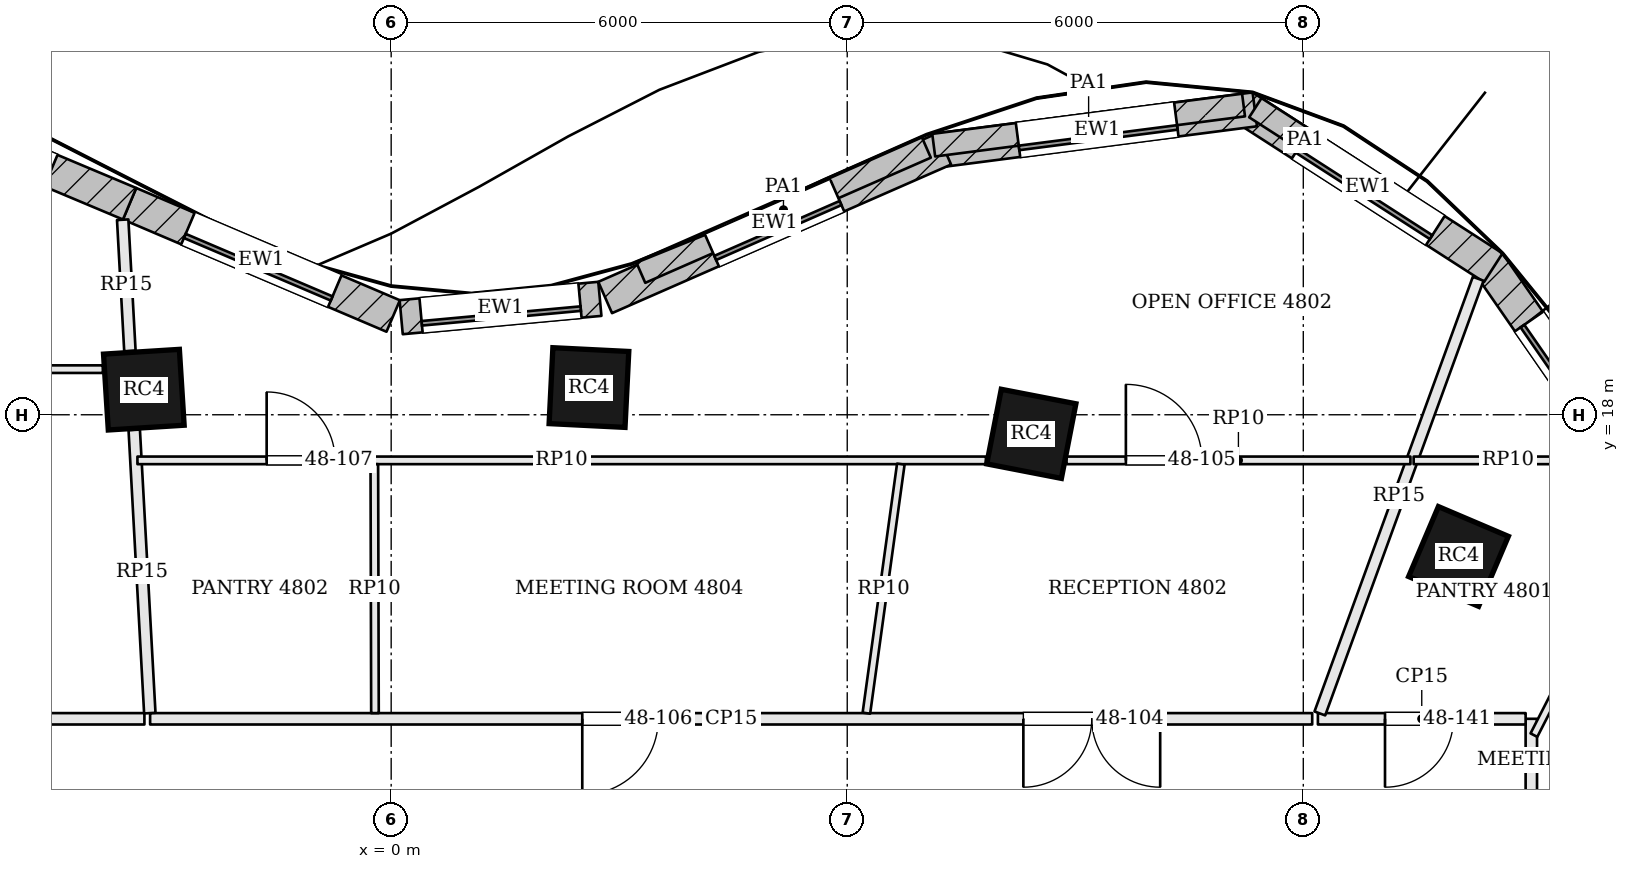
"""IFC4 building model, lengths in metres.
Left out: names, types, materials, properties, quantities, classifications, styles, units other than length and angle.
Written with IfcOpenShell. Run it as: python <this file> out.ifc"""

import sys

from ifc_helpers import new_model, si_unit, direction, frame, frame_2d, origin, origin_2d, place, context, subcontext, project, spatial, rectangle, extrude, element, fill, save


model = new_model("IFC4")
c1 = context("Model", 3, precision=1e-05, world=origin(), true_north=direction((0.0, 1.0)))
c2 = subcontext(c1, "Body", "Model", "MODEL_VIEW")
j1 = project(units=[si_unit("LENGTHUNIT", "METRE"), si_unit("PLANEANGLEUNIT", "RADIAN")], contexts=[c1])
p1 = place(None, origin())
s1 = spatial("IfcSite", under=j1, at=p1, CompositionType="ELEMENT")
p2 = place(p1, origin())
s2 = spatial("IfcBuilding", under=s1, at=p2, CompositionType="ELEMENT")
p3 = place(p2, frame((0.0, 0.0, 197.4)))
s3 = spatial("IfcBuildingStorey", under=s2, at=p3, CompositionType="ELEMENT", Elevation=197.4)
for number, where, z_axis, x_axis in (
    (1, (14.042, 16.136, 0.0), (0.0, 0.0, 1.0), (-0.92, 0.392, 0.0)),
    (2, (8.422, 17.749, 0.0), (0.0, 0.0, 1.0), (-0.982, 0.191, 0.0)),
    (3, (2.602, 18.358, 0.0), (0.0, 0.0, 1.0), (-0.999, 0.05, 0.0)),
    (4, (-3.254, 18.33, 0.0), (0.0, 0.0, 1.0), (-0.998, -0.063, 0.0)),
):
    element("IfcColumn", number, at=place(p3, frame(where, z_axis=z_axis, x_axis=x_axis)), inside=s3, PredefinedType="COLUMN", context=c2, shape_type="SweptSolid", body=[
        extrude(rectangle(XDim=1.0, YDim=1.0, at=origin_2d()), origin(), (0.0, 0.0, 1.0), 3.9),
    ])
p4 = place(p3, frame((16.695, 16.737, 0.0), z_axis=(0.0, 0.0, 1.0), x_axis=(-0.569652445465, 0.821885692402, 0.0)))
e5 = element("IfcWall", 5, at=p4, inside=s3, PredefinedType="SOLIDWALL", context=c2, shape_type="SweptSolid", body=[
    extrude(rectangle(XDim=3.959, YDim=0.45, at=frame_2d((1.979, 0.0))), origin(), (0.0, 0.0, 1.0), 3.7),
])
p5 = place(p4, frame((0.929, 0.0, 0.9)))
e6 = element("IfcOpeningElement", 6, at=p5, cuts=e5, PredefinedType="OPENING", context=c2, shape_type="SweptSolid", body=[
    extrude(rectangle(XDim=2.1, YDim=2.3, at=frame_2d((1.05, 1.15))), frame((0.0, 0.235, 0.0), z_axis=(0.0, -1.0, 0.0), x_axis=(1.0, 0.0, 0.0)), (0.0, 0.0, 1.0), 0.47),
])
p6 = place(p3, frame((14.499, 19.935, 0.0), z_axis=(0.0, 0.0, 1.0), x_axis=(-0.84080910763, 0.541331732422, 0.0)))
e7 = element("IfcWall", 7, at=p6, inside=s3, PredefinedType="SOLIDWALL", context=c2, shape_type="SweptSolid", body=[
    extrude(rectangle(XDim=3.911, YDim=0.45, at=frame_2d((1.955, 0.0))), origin(), (0.0, 0.0, 1.0), 3.7),
])
p7 = place(p6, frame((0.905, 0.0, 0.9)))
e8 = element("IfcOpeningElement", 8, at=p7, cuts=e7, PredefinedType="OPENING", context=c2, shape_type="SweptSolid", body=[
    extrude(rectangle(XDim=2.1, YDim=2.3, at=frame_2d((1.05, 1.15))), frame((0.0, 0.235, 0.0), z_axis=(0.0, -1.0, 0.0), x_axis=(1.0, 0.0, 0.0)), (0.0, 0.0, 1.0), 0.47),
])
p8 = place(p3, frame((11.362, 22.018, 0.0), z_axis=(0.0, 0.0, 1.0), x_axis=(-0.991724958022, -0.128380713645, 0.0)))
e9 = element("IfcWall", 9, at=p8, inside=s3, PredefinedType="SOLIDWALL", context=c2, shape_type="SweptSolid", body=[
    extrude(rectangle(XDim=4.182, YDim=0.45, at=frame_2d((2.091, 0.0))), origin(), (0.0, 0.0, 1.0), 3.7),
])
p9 = place(p8, frame((1.041, 0.0, 0.9)))
e10 = element("IfcOpeningElement", 10, at=p9, cuts=e9, PredefinedType="OPENING", context=c2, shape_type="SweptSolid", body=[
    extrude(rectangle(XDim=2.1, YDim=2.3, at=frame_2d((1.05, 1.15))), frame((0.0, 0.235, 0.0), z_axis=(0.0, -1.0, 0.0), x_axis=(1.0, 0.0, 0.0)), (0.0, 0.0, 1.0), 0.47),
])
p10 = place(p3, frame((7.276, 21.498, 0.0), z_axis=(0.0, 0.0, 1.0), x_axis=(-0.915872941312, -0.401468249519, 0.0)))
e11 = element("IfcWall", 11, at=p10, inside=s3, PredefinedType="SOLIDWALL", context=c2, shape_type="SweptSolid", body=[
    extrude(rectangle(XDim=4.87, YDim=0.45, at=frame_2d((2.435, 0.0))), origin(), (0.0, 0.0, 1.0), 3.7),
])
p11 = place(p10, frame((1.535, 0.0, 0.9)))
e12 = element("IfcOpeningElement", 12, at=p11, cuts=e11, PredefinedType="OPENING", context=c2, shape_type="SweptSolid", body=[
    extrude(rectangle(XDim=1.8, YDim=2.3, at=frame_2d((0.9, 1.15))), frame((0.0, 0.235, 0.0), z_axis=(0.0, -1.0, 0.0), x_axis=(1.0, 0.0, 0.0)), (0.0, 0.0, 1.0), 0.47),
])
p12 = place(p3, frame((2.745, 19.525, 0.0), z_axis=(0.0, 0.0, 1.0), x_axis=(-0.995768774275, -0.091894222771, 0.0)))
e13 = element("IfcWall", 13, at=p12, inside=s3, PredefinedType="SOLIDWALL", context=c2, shape_type="SweptSolid", body=[
    extrude(rectangle(XDim=2.625, YDim=0.45, at=frame_2d((1.312, 0.0))), origin(), (0.0, 0.0, 1.0), 3.7),
])
p13 = place(p12, frame((0.262, 0.0, 0.9)))
e14 = element("IfcOpeningElement", 14, at=p13, cuts=e13, PredefinedType="OPENING", context=c2, shape_type="SweptSolid", body=[
    extrude(rectangle(XDim=2.1, YDim=2.3, at=frame_2d((1.05, 1.15))), frame((0.0, 0.235, 0.0), z_axis=(0.0, -1.0, 0.0), x_axis=(1.0, 0.0, 0.0)), (0.0, 0.0, 1.0), 0.47),
])
p14 = place(p3, frame((0.026, 19.299, 0.0), z_axis=(0.0, 0.0, 1.0), x_axis=(-0.920040408927, 0.391823488245, 0.0)))
e15 = element("IfcWall", 15, at=p14, inside=s3, PredefinedType="SOLIDWALL", context=c2, shape_type="SweptSolid", body=[
    extrude(rectangle(XDim=3.77, YDim=0.45, at=frame_2d((1.885, 0.0))), origin(), (0.0, 0.0, 1.0), 3.7),
])
p15 = place(p14, frame((0.835, 0.0, 0.9)))
e16 = element("IfcOpeningElement", 16, at=p15, cuts=e15, PredefinedType="OPENING", context=c2, shape_type="SweptSolid", body=[
    extrude(rectangle(XDim=2.1, YDim=2.3, at=frame_2d((1.05, 1.15))), frame((0.0, 0.235, 0.0), z_axis=(0.0, -1.0, 0.0), x_axis=(1.0, 0.0, 0.0)), (0.0, 0.0, 1.0), 0.47),
])
p16 = place(p3, frame((-3.441, 20.776, 0.0), z_axis=(0.0, 0.0, 1.0), x_axis=(-0.921988121387, 0.387218160758, 0.0)))
e17 = element("IfcWall", 17, at=p16, inside=s3, PredefinedType="SOLIDWALL", context=c2, shape_type="SweptSolid", body=[
    extrude(rectangle(XDim=4.347, YDim=0.45, at=frame_2d((2.173, 0.0))), origin(), (0.0, 0.0, 1.0), 3.7),
])
p17 = place(p16, frame((1.123, 0.0, 0.9)))
e18 = element("IfcOpeningElement", 18, at=p17, cuts=e17, PredefinedType="OPENING", context=c2, shape_type="SweptSolid", body=[
    extrude(rectangle(XDim=2.1, YDim=2.3, at=frame_2d((1.05, 1.15))), frame((0.0, 0.235, 0.0), z_axis=(0.0, -1.0, 0.0), x_axis=(1.0, 0.0, 0.0)), (0.0, 0.0, 1.0), 0.47),
])
p18 = place(p3, frame((12.68, 21.195, 3.9), z_axis=(0.0, 0.0, 1.0), x_axis=(-0.840806975541, 0.541335044018, 0.0)))
e19 = element("IfcWall", 19, at=p18, inside=s3, PredefinedType="PARAPET", context=c2, shape_type="SweptSolid", body=[
    extrude(rectangle(XDim=1.56, YDim=0.3, at=frame_2d((0.78, 0.0))), origin(), (0.0, 0.0, 1.0), 1.1),
])
p19 = place(p3, frame((11.214, 22.074, 3.9), z_axis=(0.0, 0.0, 1.0), x_axis=(-0.991727449614, -0.128361464939, 0.0)))
e20 = element("IfcWall", 20, at=p19, inside=s3, PredefinedType="PARAPET", context=c2, shape_type="SweptSolid", body=[
    extrude(rectangle(XDim=4.11, YDim=0.3, at=frame_2d((2.055, 0.0))), origin(), (0.0, 0.0, 1.0), 1.1),
])
p20 = place(p3, frame((7.039, 21.519, 3.9), z_axis=(0.0, 0.0, 1.0), x_axis=(-0.915890739732, -0.401427643384, 0.0)))
e21 = element("IfcWall", 21, at=p20, inside=s3, PredefinedType="PARAPET", context=c2, shape_type="SweptSolid", body=[
    extrude(rectangle(XDim=4.102, YDim=0.3, at=frame_2d((2.051, 0.0))), origin(), (0.0, 0.0, 1.0), 1.1),
])
p21 = place(p3, frame((15.0, 10.196, 0.0), z_axis=(0.0, 0.0, 1.0), x_axis=(0.0, 1.0, 0.0)))
e22 = element("IfcWall", 22, at=p21, inside=s3, PredefinedType="PARTITIONING", context=c2, shape_type="SweptSolid", body=[
    extrude(rectangle(XDim=3.804, YDim=0.15, at=frame_2d((1.902, 0.0))), origin(), (0.0, 0.0, 1.0), 3.084),
])
p22 = place(p21, frame((1.781, 0.0, 0.0)))
e23 = element("IfcOpeningElement", 23, at=p22, cuts=e22, PredefinedType="OPENING", context=c2, shape_type="SweptSolid", body=[
    extrude(rectangle(XDim=1.0, YDim=2.4, at=frame_2d((0.5, 1.2))), frame((0.0, 0.085, 0.0), z_axis=(0.0, -1.0, 0.0), x_axis=(1.0, 0.0, 0.0)), (0.0, 0.0, 1.0), 0.17),
])
p23 = place(p3, frame((14.925, 14.0, 0.0), z_axis=(0.0, 0.0, 1.0), x_axis=(-1.0, 0.0, 0.0)))
e24 = element("IfcWall", 24, at=p23, inside=s3, PredefinedType="PARTITIONING", context=c2, shape_type="SweptSolid", body=[
    extrude(rectangle(XDim=2.733, YDim=0.15, at=frame_2d((1.366, 0.0))), origin(), (0.0, 0.0, 1.0), 3.084),
])
p24 = place(p23, frame((0.95, 0.0, 0.0)))
e25 = element("IfcOpeningElement", 25, at=p24, cuts=e24, PredefinedType="OPENING", context=c2, shape_type="SweptSolid", body=[
    extrude(rectangle(XDim=0.9, YDim=2.1, at=frame_2d((0.45, 1.05))), frame((0.0, 0.085, 0.0), z_axis=(0.0, -1.0, 0.0), x_axis=(1.0, 0.0, 0.0)), (0.0, 0.0, 1.0), 0.17),
])
p25 = place(p3, frame((14.301, 19.789, 0.0), z_axis=(0.0, 0.0, 1.0), x_axis=(-0.342258353436, -0.9396058852, 0.0)))
e26 = element("IfcWall", 26, at=p25, inside=s3, PredefinedType="PARTITIONING", context=c2, shape_type="SweptSolid", body=[
    extrude(rectangle(XDim=6.086, YDim=0.15, at=frame_2d((3.043, 0.0))), origin(), (0.0, 0.0, 1.0), 3.084),
])
p26 = place(p3, frame((12.117, 14.0, 0.0), z_axis=(0.0, 0.0, 1.0), x_axis=(-1.0, 0.0, 0.0)))
e27 = element("IfcWall", 27, at=p26, inside=s3, PredefinedType="PARTITIONING", context=c2, shape_type="SweptSolid", body=[
    extrude(rectangle(XDim=15.289, YDim=0.15, at=frame_2d((7.644, 0.0))), origin(), (0.0, 0.0, 1.0), 3.084),
])
p27 = place(p26, frame((2.0, 0.0, 0.0)))
e28 = element("IfcOpeningElement", 28, at=p27, cuts=e27, PredefinedType="OPENING", context=c2, shape_type="SweptSolid", body=[
    extrude(rectangle(XDim=1.8, YDim=2.1, at=frame_2d((0.9, 1.05))), frame((0.0, 0.085, 0.0), z_axis=(0.0, -1.0, 0.0), x_axis=(1.0, 0.0, 0.0)), (0.0, 0.0, 1.0), 0.17),
])
p28 = place(p26, frame((8.603, 0.0, 0.0)))
e29 = element("IfcOpeningElement", 29, at=p28, cuts=e27, PredefinedType="OPENING", context=c2, shape_type="SweptSolid", body=[
    extrude(rectangle(XDim=1.0, YDim=2.4, at=frame_2d((0.5, 1.2))), frame((0.0, 0.085, 0.0), z_axis=(0.0, -1.0, 0.0), x_axis=(1.0, 0.0, 0.0)), (0.0, 0.0, 1.0), 0.17),
])
p29 = place(p3, frame((-3.532, 20.566, 0.0), z_axis=(0.0, 0.0, 1.0), x_axis=(0.054930375168, -0.998490187175, 0.0)))
e30 = element("IfcWall", 30, at=p29, inside=s3, PredefinedType="PARTITIONING", context=c2, shape_type="SweptSolid", body=[
    extrude(rectangle(XDim=1.729, YDim=0.15, at=frame_2d((0.865, 0.0))), origin(), (0.0, 0.0, 1.0), 3.084),
])
p30 = place(p3, frame((-3.38, 17.801, 0.0), z_axis=(0.0, 0.0, 1.0), x_axis=(0.054890258028, -0.998492393348, 0.0)))
e31 = element("IfcWall", 31, at=p30, inside=s3, PredefinedType="PARTITIONING", context=c2, shape_type="SweptSolid", body=[
    extrude(rectangle(XDim=3.732, YDim=0.15, at=frame_2d((1.866, 0.0))), origin(), (0.0, 0.0, 1.0), 3.084),
])
p31 = place(p3, frame((-3.246, 14.0, 0.0), z_axis=(0.0, 0.0, 1.0), x_axis=(-1.0, 0.0, 0.0)))
e32 = element("IfcWall", 32, at=p31, inside=s3, PredefinedType="PARTITIONING", context=c2, shape_type="SweptSolid", body=[
    extrude(rectangle(XDim=11.754, YDim=0.15, at=frame_2d((5.877, 0.0))), origin(), (0.0, 0.0, 1.0), 3.084),
])
p32 = place(p31, frame((2.025, 0.0, 0.0)))
e33 = element("IfcOpeningElement", 33, at=p32, cuts=e32, PredefinedType="OPENING", context=c2, shape_type="SweptSolid", body=[
    extrude(rectangle(XDim=1.8, YDim=2.1, at=frame_2d((0.9, 1.05))), frame((0.0, 0.085, 0.0), z_axis=(0.0, -1.0, 0.0), x_axis=(1.0, 0.0, 0.0)), (0.0, 0.0, 1.0), 0.17),
])
p33 = place(p31, frame((6.792, 0.0, 0.0)))
e34 = element("IfcOpeningElement", 34, at=p33, cuts=e32, PredefinedType="OPENING", context=c2, shape_type="SweptSolid", body=[
    extrude(rectangle(XDim=1.0, YDim=2.4, at=frame_2d((0.5, 1.2))), frame((0.0, 0.085, 0.0), z_axis=(0.0, -1.0, 0.0), x_axis=(1.0, 0.0, 0.0)), (0.0, 0.0, 1.0), 0.17),
])
p34 = place(p31, frame((9.702, 0.0, 0.0)))
e35 = element("IfcOpeningElement", 35, at=p34, cuts=e32, PredefinedType="OPENING", context=c2, shape_type="SweptSolid", body=[
    extrude(rectangle(XDim=1.0, YDim=2.4, at=frame_2d((0.5, 1.2))), frame((0.0, 0.085, 0.0), z_axis=(0.0, -1.0, 0.0), x_axis=(1.0, 0.0, 0.0)), (0.0, 0.0, 1.0), 0.17),
])
p35 = place(p3, frame((13.452, 17.4, 0.0), z_axis=(0.0, 0.0, 1.0), x_axis=(1.0, 0.0, 0.0)))
e36 = element("IfcWall", 36, at=p35, inside=s3, PredefinedType="PARTITIONING", context=c2, shape_type="SweptSolid", body=[
    extrude(rectangle(XDim=2.486, YDim=0.1, at=frame_2d((1.243, 0.0))), origin(), (0.0, 0.0, 1.0), 3.084),
])
p36 = place(p3, frame((15.049, 11.292, 0.0), z_axis=(0.0, 0.0, 1.0), x_axis=(0.759202764933, 0.650854178536, 0.0)))
e37 = element("IfcWall", 37, at=p36, inside=s3, PredefinedType="PARTITIONING", context=c2, shape_type="SweptSolid", body=[
    extrude(rectangle(XDim=4.802, YDim=0.1, at=frame_2d((2.401, 0.0))), origin(), (0.0, 0.0, 1.0), 3.084),
])
p37 = place(p3, frame((15.034, 13.785, 0.0), z_axis=(0.0, 0.0, 1.0), x_axis=(0.455523603198, 0.890223706115, 0.0)))
e38 = element("IfcWall", 38, at=p37, inside=s3, PredefinedType="PARTITIONING", context=c2, shape_type="SweptSolid", body=[
    extrude(rectangle(XDim=3.201, YDim=0.1, at=frame_2d((1.6, 0.0))), origin(), (0.0, 0.0, 1.0), 3.084),
])
p38 = place(p3, frame((-3.338, 17.4, 0.0), z_axis=(0.0, 0.0, 1.0), x_axis=(1.0, 0.0, 0.0)))
e39 = element("IfcWall", 39, at=p38, inside=s3, PredefinedType="PARTITIONING", context=c2, shape_type="SweptSolid", body=[
    extrude(rectangle(XDim=11.163, YDim=0.1, at=frame_2d((5.581, 0.0))), origin(), (0.0, 0.0, 1.0), 3.084),
])
p39 = place(p38, frame((1.7, 0.0, 0.0)))
e40 = element("IfcOpeningElement", 40, at=p39, cuts=e39, PredefinedType="OPENING", context=c2, shape_type="SweptSolid", body=[
    extrude(rectangle(XDim=0.9, YDim=2.1, at=frame_2d((0.45, 1.05))), frame((0.0, 0.06, 0.0), z_axis=(0.0, -1.0, 0.0), x_axis=(1.0, 0.0, 0.0)), (0.0, 0.0, 1.0), 0.12),
])
p40 = place(p3, frame((8.884, 17.4, 0.0), z_axis=(0.0, 0.0, 1.0), x_axis=(1.0, 0.0, 0.0)))
e41 = element("IfcWall", 41, at=p40, inside=s3, PredefinedType="PARTITIONING", context=c2, shape_type="SweptSolid", body=[
    extrude(rectangle(XDim=4.525, YDim=0.1, at=frame_2d((2.263, 0.0))), origin(), (0.0, 0.0, 1.0), 3.084),
])
p41 = place(p40, frame((0.782, 0.0, 0.0)))
e42 = element("IfcOpeningElement", 42, at=p41, cuts=e41, PredefinedType="OPENING", context=c2, shape_type="SweptSolid", body=[
    extrude(rectangle(XDim=1.0, YDim=2.1, at=frame_2d((0.5, 1.05))), frame((0.0, 0.06, 0.0), z_axis=(0.0, -1.0, 0.0), x_axis=(1.0, 0.0, 0.0)), (0.0, 0.0, 1.0), 0.12),
])
p42 = place(p3, frame((6.252, 14.074, 0.0), z_axis=(0.0, 0.0, 1.0), x_axis=(0.136997065373, 0.990571453293, 0.0)))
e43 = element("IfcWall", 43, at=p42, inside=s3, PredefinedType="PARTITIONING", context=c2, shape_type="SweptSolid", body=[
    extrude(rectangle(XDim=3.308, YDim=0.1, at=frame_2d((1.654, 0.0))), origin(), (0.0, 0.0, 1.0), 3.084),
])
p43 = place(p3, frame((-0.213, 14.075, 0.0), z_axis=(0.0, 0.0, 1.0), x_axis=(-0.002534468192, 0.99999678823, 0.0)))
e44 = element("IfcWall", 44, at=p43, inside=s3, PredefinedType="PARTITIONING", context=c2, shape_type="SweptSolid", body=[
    extrude(rectangle(XDim=3.275, YDim=0.1, at=frame_2d((1.638, 0.0))), origin(), (0.0, 0.0, 1.0), 3.084),
])
p44 = place(p3, frame((-13.88, 18.6, 0.0), z_axis=(0.0, 0.0, 1.0), x_axis=(1.0, 0.0, 0.0)))
e45 = element("IfcWall", 45, at=p44, inside=s3, PredefinedType="PARTITIONING", context=c2, shape_type="SweptSolid", body=[
    extrude(rectangle(XDim=10.088, YDim=0.1, at=frame_2d((5.044, 0.0))), origin(), (0.0, 0.0, 1.0), 3.084),
])
p45 = place(p44, frame((6.458, 0.0, 0.0)))
e46 = element("IfcOpeningElement", 46, at=p45, cuts=e45, PredefinedType="OPENING", context=c2, shape_type="SweptSolid", body=[
    extrude(rectangle(XDim=1.0, YDim=2.1, at=frame_2d((0.5, 1.05))), frame((0.0, 0.06, 0.0), z_axis=(0.0, -1.0, 0.0), x_axis=(1.0, 0.0, 0.0)), (0.0, 0.0, 1.0), 0.12),
])
p46 = place(p5, origin())
e47 = element("IfcWindow", 47, at=p46, inside=s3, PartitioningType="SINGLE_PANEL", PredefinedType="WINDOW", context=c2, shape_type="SweptSolid", body=[
    extrude(rectangle(XDim=2.1, YDim=2.3, at=frame_2d((1.05, 1.15))), frame((0.0, 0.135, 0.0), z_axis=(0.0, -1.0, 0.0), x_axis=(1.0, 0.0, 0.0)), (0.0, 0.0, 1.0), 0.06),
])
fill(e6, e47)
p47 = place(p7, origin())
e48 = element("IfcWindow", 48, at=p47, inside=s3, PartitioningType="SINGLE_PANEL", PredefinedType="WINDOW", context=c2, shape_type="SweptSolid", body=[
    extrude(rectangle(XDim=2.1, YDim=2.3, at=frame_2d((1.05, 1.15))), frame((0.0, 0.135, 0.0), z_axis=(0.0, -1.0, 0.0), x_axis=(1.0, 0.0, 0.0)), (0.0, 0.0, 1.0), 0.06),
])
fill(e8, e48)
p48 = place(p9, origin())
e49 = element("IfcWindow", 49, at=p48, inside=s3, PartitioningType="SINGLE_PANEL", PredefinedType="WINDOW", context=c2, shape_type="SweptSolid", body=[
    extrude(rectangle(XDim=2.1, YDim=2.3, at=frame_2d((1.05, 1.15))), frame((0.0, 0.135, 0.0), z_axis=(0.0, -1.0, 0.0), x_axis=(1.0, 0.0, 0.0)), (0.0, 0.0, 1.0), 0.06),
])
fill(e10, e49)
p49 = place(p11, origin())
e50 = element("IfcWindow", 50, at=p49, inside=s3, PartitioningType="SINGLE_PANEL", PredefinedType="WINDOW", context=c2, shape_type="SweptSolid", body=[
    extrude(rectangle(XDim=1.8, YDim=2.3, at=frame_2d((0.9, 1.15))), frame((0.0, 0.135, 0.0), z_axis=(0.0, -1.0, 0.0), x_axis=(1.0, 0.0, 0.0)), (0.0, 0.0, 1.0), 0.06),
])
fill(e12, e50)
p50 = place(p13, origin())
e51 = element("IfcWindow", 51, at=p50, inside=s3, PartitioningType="SINGLE_PANEL", PredefinedType="WINDOW", context=c2, shape_type="SweptSolid", body=[
    extrude(rectangle(XDim=2.1, YDim=2.3, at=frame_2d((1.05, 1.15))), frame((0.0, 0.135, 0.0), z_axis=(0.0, -1.0, 0.0), x_axis=(1.0, 0.0, 0.0)), (0.0, 0.0, 1.0), 0.06),
])
fill(e14, e51)
p51 = place(p15, origin())
e52 = element("IfcWindow", 52, at=p51, inside=s3, PartitioningType="SINGLE_PANEL", PredefinedType="WINDOW", context=c2, shape_type="SweptSolid", body=[
    extrude(rectangle(XDim=2.1, YDim=2.3, at=frame_2d((1.05, 1.15))), frame((0.0, 0.135, 0.0), z_axis=(0.0, -1.0, 0.0), x_axis=(1.0, 0.0, 0.0)), (0.0, 0.0, 1.0), 0.06),
])
fill(e16, e52)
p52 = place(p27, origin())
e53 = element("IfcDoor", 53, at=p52, inside=s3, OperationType="DOUBLE_DOOR_SINGLE_SWING", PredefinedType="DOOR", context=c2, shape_type="SweptSolid", body=[
    extrude(rectangle(XDim=1.8, YDim=2.1, at=frame_2d((0.9, 1.05))), frame((0.0, 0.025, 0.0), z_axis=(0.0, -1.0, 0.0), x_axis=(1.0, 0.0, 0.0)), (0.0, 0.0, 1.0), 0.05),
])
fill(e28, e53)
p53 = place(p41, origin())
e54 = element("IfcDoor", 54, at=p53, inside=s3, OperationType="SINGLE_SWING_LEFT", PredefinedType="DOOR", context=c2, shape_type="SweptSolid", body=[
    extrude(rectangle(XDim=1.0, YDim=2.1, at=frame_2d((0.5, 1.05))), frame((0.0, 0.025, 0.0), z_axis=(0.0, -1.0, 0.0), x_axis=(1.0, 0.0, 0.0)), (0.0, 0.0, 1.0), 0.05),
])
fill(e42, e54)
p54 = place(p28, origin())
e55 = element("IfcDoor", 55, at=p54, inside=s3, OperationType="SINGLE_SWING_RIGHT", PredefinedType="DOOR", context=c2, shape_type="SweptSolid", body=[
    extrude(rectangle(XDim=1.0, YDim=2.4, at=frame_2d((0.5, 1.2))), frame((0.0, 0.025, 0.0), z_axis=(0.0, -1.0, 0.0), x_axis=(1.0, 0.0, 0.0)), (0.0, 0.0, 1.0), 0.05),
])
fill(e29, e55)
p55 = place(p39, origin())
e56 = element("IfcDoor", 56, at=p55, inside=s3, OperationType="SINGLE_SWING_LEFT", PredefinedType="DOOR", context=c2, shape_type="SweptSolid", body=[
    extrude(rectangle(XDim=0.9, YDim=2.1, at=frame_2d((0.45, 1.05))), frame((0.0, 0.025, 0.0), z_axis=(0.0, -1.0, 0.0), x_axis=(1.0, 0.0, 0.0)), (0.0, 0.0, 1.0), 0.05),
])
fill(e40, e56)
p56 = place(p24, origin())
e57 = element("IfcDoor", 57, at=p56, inside=s3, OperationType="SINGLE_SWING_RIGHT", PredefinedType="DOOR", context=c2, shape_type="SweptSolid", body=[
    extrude(rectangle(XDim=0.9, YDim=2.1, at=frame_2d((0.45, 1.05))), frame((0.0, 0.025, 0.0), z_axis=(0.0, -1.0, 0.0), x_axis=(1.0, 0.0, 0.0)), (0.0, 0.0, 1.0), 0.05),
])
fill(e25, e57)
save(model, sys.argv[1])
